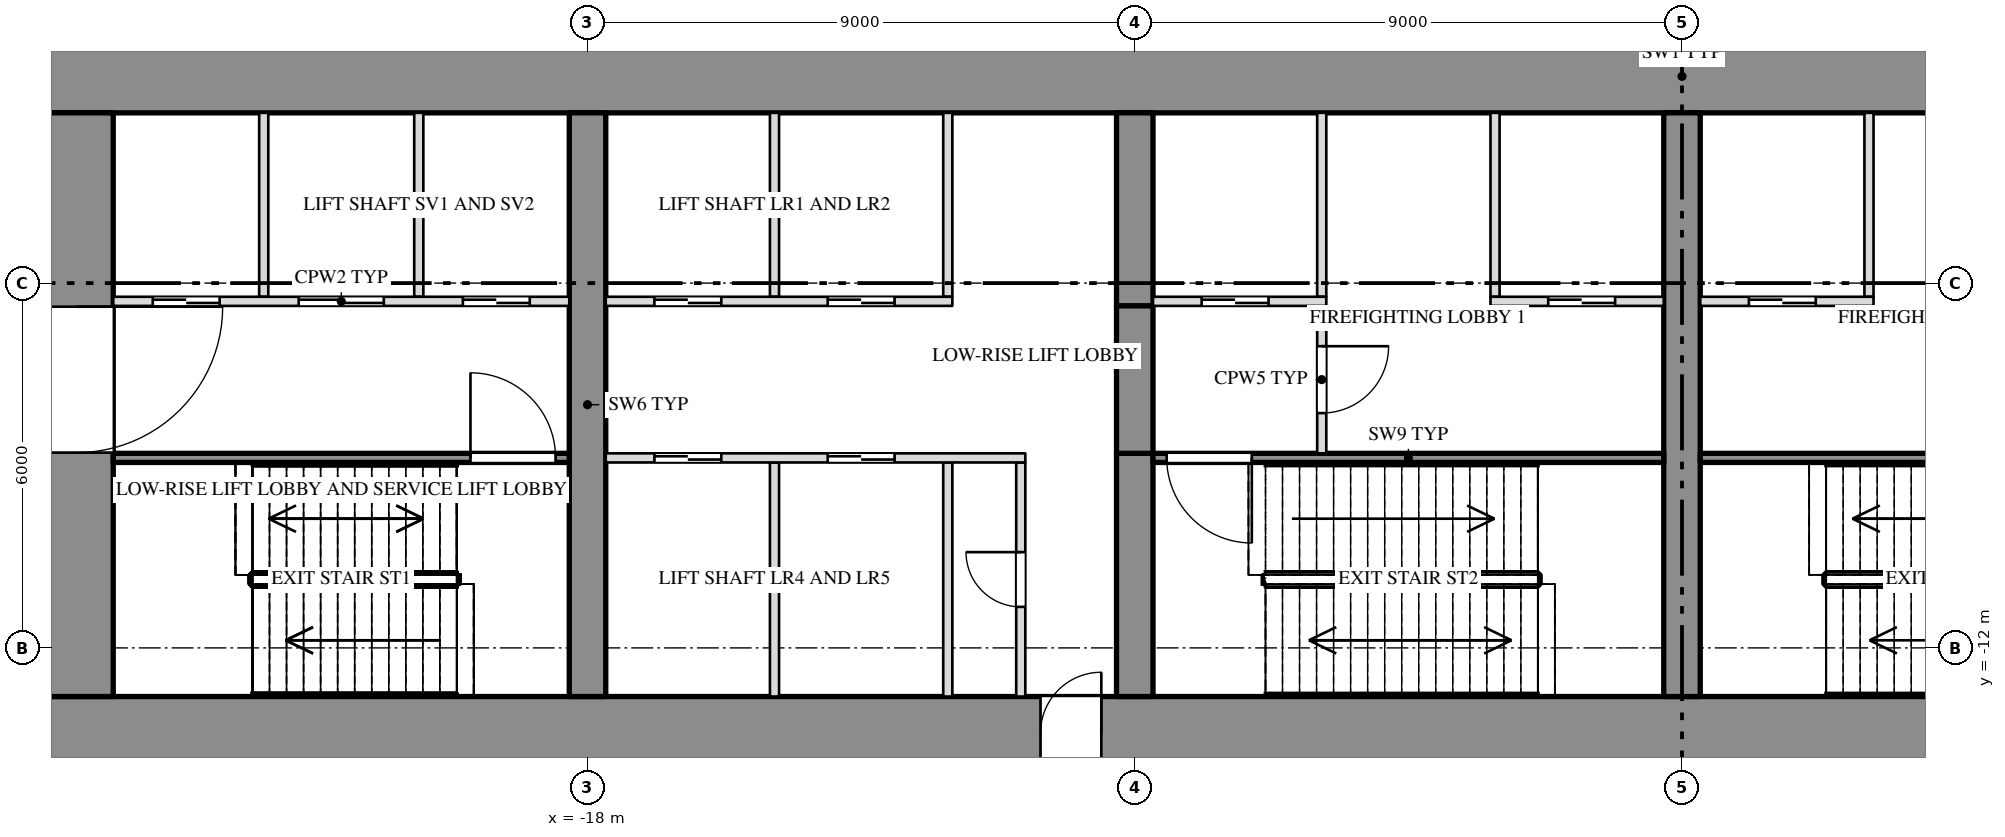
"""IFC4 building model, lengths in metres.
Left out: names, types, materials, properties, quantities, classifications, styles, units other than length and angle.
Written with IfcOpenShell. Run it as: python <this file> out.ifc"""

import sys

from ifc_helpers import new_model, si_unit, direction, frame, frame_2d, origin, place, context, subcontext, project, spatial, rectangle, extrude, element, fill, save


model = new_model("IFC4")
c1 = context("Model", 3, precision=1e-05, world=origin(), true_north=direction((0.0, 1.0)))
c2 = subcontext(c1, "Body", "Model", "MODEL_VIEW")
j1 = project(units=[si_unit("LENGTHUNIT", "METRE"), si_unit("PLANEANGLEUNIT", "RADIAN")], contexts=[c1])
p1 = place(None, origin())
s1 = spatial("IfcSite", under=j1, at=p1, CompositionType="ELEMENT")
p2 = place(p1, origin())
s2 = spatial("IfcBuilding", under=s1, at=p2, CompositionType="ELEMENT")
p3 = place(p2, frame((0.0, 0.0, 21.0)))
s3 = spatial("IfcBuildingStorey", under=s2, at=p3, CompositionType="ELEMENT", Elevation=21.0)
p4 = place(p3, frame((-27.0, -2.6, 0.0), z_axis=(0.0, 0.0, 1.0), x_axis=(1.0, 0.0, 0.0)))
e1 = element("IfcWall", 1, at=p4, inside=s3, PredefinedType="SHEAR", context=c2, shape_type="SweptSolid", body=[
    extrude(rectangle(XDim=54.0, YDim=1.2, at=frame_2d((27.0, 0.0))), origin(), (0.0, 0.0, 1.0), 5.7),
])
p5 = place(p3, frame((-27.0, -13.4, 0.0), z_axis=(0.0, 0.0, 1.0), x_axis=(1.0, 0.0, 0.0)))
e2 = element("IfcWall", 2, at=p5, inside=s3, PredefinedType="SHEAR", context=c2, shape_type="SweptSolid", body=[
    extrude(rectangle(XDim=54.0, YDim=1.2, at=frame_2d((27.0, 0.0))), origin(), (0.0, 0.0, 1.0), 5.7),
])
p6 = place(p5, frame((16.45, 0.0, 0.0)))
e3 = element("IfcOpeningElement", 3, at=p6, cuts=e2, PredefinedType="OPENING", context=c2, shape_type="SweptSolid", body=[
    extrude(rectangle(XDim=1.0, YDim=2.1, at=frame_2d((0.5, 1.05))), frame((0.0, 0.612, 0.0), z_axis=(0.0, -1.0, 0.0), x_axis=(1.0, 0.0, 0.0)), (0.0, 0.0, 1.0), 1.224),
])
p7 = place(p5, frame((36.55, 0.0, 0.0)))
e4 = element("IfcOpeningElement", 4, at=p7, cuts=e2, PredefinedType="OPENING", context=c2, shape_type="SweptSolid", body=[
    extrude(rectangle(XDim=1.0, YDim=2.1, at=frame_2d((0.5, 1.05))), frame((0.0, 0.612, 0.0), z_axis=(0.0, -1.0, 0.0), x_axis=(1.0, 0.0, 0.0)), (0.0, 0.0, 1.0), 1.224),
])
p8 = place(p3, frame((-26.4, -12.8, 0.0), z_axis=(0.0, 0.0, 1.0), x_axis=(0.0, 1.0, 0.0)))
e5 = element("IfcWall", 5, at=p8, inside=s3, PredefinedType="SHEAR", context=c2, shape_type="SweptSolid", body=[
    extrude(rectangle(XDim=9.6, YDim=1.2, at=frame_2d((4.8, 0.0))), origin(), (0.0, 0.0, 1.0), 5.7),
])
p9 = place(p8, frame((4.012, 0.0, 0.0)))
e6 = element("IfcOpeningElement", 6, at=p9, cuts=e5, PredefinedType="OPENING", context=c2, shape_type="SweptSolid", body=[
    extrude(rectangle(XDim=2.4, YDim=2.1, at=frame_2d((1.2, 1.05))), frame((0.0, 0.612, 0.0), z_axis=(0.0, -1.0, 0.0), x_axis=(1.0, 0.0, 0.0)), (0.0, 0.0, 1.0), 1.224),
])
p10 = place(p3, frame((-18.0, -12.8, 0.0), z_axis=(0.0, 0.0, 1.0), x_axis=(0.0, 1.0, 0.0)))
e7 = element("IfcWall", 7, at=p10, inside=s3, PredefinedType="SHEAR", context=c2, shape_type="SweptSolid", body=[
    extrude(rectangle(XDim=9.6, YDim=0.6, at=frame_2d((4.8, 0.0))), origin(), (0.0, 0.0, 1.0), 5.7),
])
p11 = place(p3, frame((-9.0, -12.8, 0.0), z_axis=(0.0, 0.0, 1.0), x_axis=(0.0, 1.0, 0.0)))
e8 = element("IfcWall", 8, at=p11, inside=s3, PredefinedType="SHEAR", context=c2, shape_type="SweptSolid", body=[
    extrude(rectangle(XDim=4.0, YDim=0.6, at=frame_2d((2.0, 0.0))), origin(), (0.0, 0.0, 1.0), 5.7),
])
p12 = place(p3, frame((-9.0, -6.375, 0.0), z_axis=(0.0, 0.0, 1.0), x_axis=(0.0, 1.0, 0.0)))
e9 = element("IfcWall", 9, at=p12, inside=s3, PredefinedType="SHEAR", context=c2, shape_type="SweptSolid", body=[
    extrude(rectangle(XDim=3.175, YDim=0.6, at=frame_2d((1.587, 0.0))), origin(), (0.0, 0.0, 1.0), 5.7),
])
p13 = place(p3, frame((-9.0, -8.8, 3.6), z_axis=(0.0, 0.0, 1.0), x_axis=(0.0, 1.0, 0.0)))
e10 = element("IfcWall", 10, at=p13, inside=s3, PredefinedType="SHEAR", context=c2, shape_type="SweptSolid", body=[
    extrude(rectangle(XDim=2.425, YDim=0.6, at=frame_2d((1.212, 0.0))), origin(), (0.0, 0.0, 1.0), 2.1),
])
p14 = place(p3, frame((0.0, -12.8, 0.0), z_axis=(0.0, 0.0, 1.0), x_axis=(0.0, 1.0, 0.0)))
e11 = element("IfcWall", 11, at=p14, inside=s3, PredefinedType="SHEAR", context=c2, shape_type="SweptSolid", body=[
    extrude(rectangle(XDim=9.6, YDim=0.6, at=frame_2d((4.8, 0.0))), origin(), (0.0, 0.0, 1.0), 5.7),
])
for number, where, z_axis, x_axis in (
    (12, (-20.775, -6.225, 0.0), (0.0, 0.0, 1.0), (0.0, 1.0, 0.0)),
    (13, (-23.325, -6.225, 0.0), (0.0, 0.0, 1.0), (0.0, 1.0, 0.0)),
    (14, (-12.075, -6.225, 0.0), (0.0, 0.0, 1.0), (0.0, 1.0, 0.0)),
    (15, (-14.925, -6.225, 0.0), (0.0, 0.0, 1.0), (0.0, 1.0, 0.0)),
    (16, (-3.075, -6.225, 0.0), (0.0, 0.0, 1.0), (0.0, 1.0, 0.0)),
    (17, (-5.925, -6.225, 0.0), (0.0, 0.0, 1.0), (0.0, 1.0, 0.0)),
    (18, (3.075, -6.225, 0.0), (0.0, 0.0, 1.0), (0.0, 1.0, 0.0)),
):
    element("IfcWall", number, at=place(p3, frame(where, z_axis=z_axis, x_axis=x_axis)), inside=s3, PredefinedType="PARTITIONING", context=c2, shape_type="SweptSolid", body=[
        extrude(rectangle(XDim=3.025, YDim=0.15, at=frame_2d((1.513, 0.0))), origin(), (0.0, 0.0, 1.0), 5.7),
    ])
p15 = place(p3, frame((-10.875, -12.8, 0.0), z_axis=(0.0, 0.0, 1.0), x_axis=(0.0, 1.0, 0.0)))
e19 = element("IfcWall", 19, at=p15, inside=s3, PredefinedType="PARTITIONING", context=c2, shape_type="SweptSolid", body=[
    extrude(rectangle(XDim=3.85, YDim=0.15, at=frame_2d((1.925, 0.0))), origin(), (0.0, 0.0, 1.0), 5.7),
])
p16 = place(p15, frame((1.475, 0.0, 0.0)))
e20 = element("IfcOpeningElement", 20, at=p16, cuts=e19, PredefinedType="OPENING", context=c2, shape_type="SweptSolid", body=[
    extrude(rectangle(XDim=0.9, YDim=2.1, at=frame_2d((0.45, 1.05))), frame((0.0, 0.087, 0.0), z_axis=(0.0, -1.0, 0.0), x_axis=(1.0, 0.0, 0.0)), (0.0, 0.0, 1.0), 0.174),
])
for number, where, z_axis, x_axis in (
    (21, (-12.075, -12.8, 0.0), (0.0, 0.0, 1.0), (0.0, 1.0, 0.0)),
    (22, (-14.925, -12.8, 0.0), (0.0, 0.0, 1.0), (0.0, 1.0, 0.0)),
):
    element("IfcWall", number, at=place(p3, frame(where, z_axis=z_axis, x_axis=x_axis)), inside=s3, PredefinedType="PARTITIONING", context=c2, shape_type="SweptSolid", body=[
        extrude(rectangle(XDim=3.85, YDim=0.15, at=frame_2d((1.925, 0.0))), origin(), (0.0, 0.0, 1.0), 5.7),
    ])
p17 = place(p3, frame((-5.925, -8.8, 0.0), z_axis=(0.0, 0.0, 1.0), x_axis=(0.0, 1.0, 0.0)))
e23 = element("IfcWall", 23, at=p17, inside=s3, PredefinedType="PARTITIONING", context=c2, shape_type="SweptSolid", body=[
    extrude(rectangle(XDim=2.425, YDim=0.15, at=frame_2d((1.212, 0.0))), origin(), (0.0, 0.0, 1.0), 5.7),
])
p18 = place(p17, frame((0.662, 0.0, 0.0)))
e24 = element("IfcOpeningElement", 24, at=p18, cuts=e23, PredefinedType="OPENING", context=c2, shape_type="SweptSolid", body=[
    extrude(rectangle(XDim=1.1, YDim=2.1, at=frame_2d((0.55, 1.05))), frame((0.0, 0.087, 0.0), z_axis=(0.0, -1.0, 0.0), x_axis=(1.0, 0.0, 0.0)), (0.0, 0.0, 1.0), 0.174),
])
p19 = place(p3, frame((-25.8, -6.3, 0.0), z_axis=(0.0, 0.0, 1.0), x_axis=(1.0, 0.0, 0.0)))
e25 = element("IfcWall", 25, at=p19, inside=s3, PredefinedType="PARTITIONING", context=c2, shape_type="SweptSolid", body=[
    extrude(rectangle(XDim=7.5, YDim=0.15, at=frame_2d((3.75, 0.0))), origin(), (0.0, 0.0, 1.0), 5.7),
])
p20 = place(p19, frame((0.65, 0.0, 0.0)))
e26 = element("IfcOpeningElement", 26, at=p20, cuts=e25, PredefinedType="OPENING", context=c2, shape_type="SweptSolid", body=[
    extrude(rectangle(XDim=1.1, YDim=2.1, at=frame_2d((0.55, 1.05))), frame((0.0, 0.087, 0.0), z_axis=(0.0, -1.0, 0.0), x_axis=(1.0, 0.0, 0.0)), (0.0, 0.0, 1.0), 0.174),
])
p21 = place(p19, frame((3.05, 0.0, 0.0)))
e27 = element("IfcOpeningElement", 27, at=p21, cuts=e25, PredefinedType="OPENING", context=c2, shape_type="SweptSolid", body=[
    extrude(rectangle(XDim=1.4, YDim=2.1, at=frame_2d((0.7, 1.05))), frame((0.0, 0.087, 0.0), z_axis=(0.0, -1.0, 0.0), x_axis=(1.0, 0.0, 0.0)), (0.0, 0.0, 1.0), 0.174),
])
p22 = place(p19, frame((5.75, 0.0, 0.0)))
e28 = element("IfcOpeningElement", 28, at=p22, cuts=e25, PredefinedType="OPENING", context=c2, shape_type="SweptSolid", body=[
    extrude(rectangle(XDim=1.1, YDim=2.1, at=frame_2d((0.55, 1.05))), frame((0.0, 0.087, 0.0), z_axis=(0.0, -1.0, 0.0), x_axis=(1.0, 0.0, 0.0)), (0.0, 0.0, 1.0), 0.174),
])
p23 = place(p3, frame((-17.7, -6.3, 0.0), z_axis=(0.0, 0.0, 1.0), x_axis=(1.0, 0.0, 0.0)))
e29 = element("IfcWall", 29, at=p23, inside=s3, PredefinedType="PARTITIONING", context=c2, shape_type="SweptSolid", body=[
    extrude(rectangle(XDim=5.7, YDim=0.15, at=frame_2d((2.85, 0.0))), origin(), (0.0, 0.0, 1.0), 5.7),
])
p24 = place(p23, frame((0.8, 0.0, 0.0)))
e30 = element("IfcOpeningElement", 30, at=p24, cuts=e29, PredefinedType="OPENING", context=c2, shape_type="SweptSolid", body=[
    extrude(rectangle(XDim=1.1, YDim=2.1, at=frame_2d((0.55, 1.05))), frame((0.0, 0.087, 0.0), z_axis=(0.0, -1.0, 0.0), x_axis=(1.0, 0.0, 0.0)), (0.0, 0.0, 1.0), 0.174),
])
p25 = place(p23, frame((3.65, 0.0, 0.0)))
e31 = element("IfcOpeningElement", 31, at=p25, cuts=e29, PredefinedType="OPENING", context=c2, shape_type="SweptSolid", body=[
    extrude(rectangle(XDim=1.1, YDim=2.1, at=frame_2d((0.55, 1.05))), frame((0.0, 0.087, 0.0), z_axis=(0.0, -1.0, 0.0), x_axis=(1.0, 0.0, 0.0)), (0.0, 0.0, 1.0), 0.174),
])
p26 = place(p3, frame((-8.7, -6.3, 0.0), z_axis=(0.0, 0.0, 1.0), x_axis=(1.0, 0.0, 0.0)))
e32 = element("IfcWall", 32, at=p26, inside=s3, PredefinedType="PARTITIONING", context=c2, shape_type="SweptSolid", body=[
    extrude(rectangle(XDim=2.85, YDim=0.15, at=frame_2d((1.425, 0.0))), origin(), (0.0, 0.0, 1.0), 5.7),
])
p27 = place(p26, frame((0.8, 0.0, 0.0)))
e33 = element("IfcOpeningElement", 33, at=p27, cuts=e32, PredefinedType="OPENING", context=c2, shape_type="SweptSolid", body=[
    extrude(rectangle(XDim=1.1, YDim=2.1, at=frame_2d((0.55, 1.05))), frame((0.0, 0.087, 0.0), z_axis=(0.0, -1.0, 0.0), x_axis=(1.0, 0.0, 0.0)), (0.0, 0.0, 1.0), 0.174),
])
p28 = place(p3, frame((-3.15, -6.3, 0.0), z_axis=(0.0, 0.0, 1.0), x_axis=(1.0, 0.0, 0.0)))
e34 = element("IfcWall", 34, at=p28, inside=s3, PredefinedType="PARTITIONING", context=c2, shape_type="SweptSolid", body=[
    extrude(rectangle(XDim=2.85, YDim=0.15, at=frame_2d((1.425, 0.0))), origin(), (0.0, 0.0, 1.0), 5.7),
])
p29 = place(p28, frame((0.95, 0.0, 0.0)))
e35 = element("IfcOpeningElement", 35, at=p29, cuts=e34, PredefinedType="OPENING", context=c2, shape_type="SweptSolid", body=[
    extrude(rectangle(XDim=1.1, YDim=2.1, at=frame_2d((0.55, 1.05))), frame((0.0, 0.087, 0.0), z_axis=(0.0, -1.0, 0.0), x_axis=(1.0, 0.0, 0.0)), (0.0, 0.0, 1.0), 0.174),
])
p30 = place(p3, frame((0.3, -6.3, 0.0), z_axis=(0.0, 0.0, 1.0), x_axis=(1.0, 0.0, 0.0)))
e36 = element("IfcWall", 36, at=p30, inside=s3, PredefinedType="PARTITIONING", context=c2, shape_type="SweptSolid", body=[
    extrude(rectangle(XDim=2.85, YDim=0.15, at=frame_2d((1.425, 0.0))), origin(), (0.0, 0.0, 1.0), 5.7),
])
p31 = place(p30, frame((0.8, 0.0, 0.0)))
e37 = element("IfcOpeningElement", 37, at=p31, cuts=e36, PredefinedType="OPENING", context=c2, shape_type="SweptSolid", body=[
    extrude(rectangle(XDim=1.1, YDim=2.1, at=frame_2d((0.55, 1.05))), frame((0.0, 0.087, 0.0), z_axis=(0.0, -1.0, 0.0), x_axis=(1.0, 0.0, 0.0)), (0.0, 0.0, 1.0), 0.174),
])
p32 = place(p3, frame((-25.8, -8.875, 0.0), z_axis=(0.0, 0.0, 1.0), x_axis=(1.0, 0.0, 0.0)))
e38 = element("IfcWall", 38, at=p32, inside=s3, PredefinedType="SHEAR", context=c2, shape_type="SweptSolid", body=[
    extrude(rectangle(XDim=7.5, YDim=0.15, at=frame_2d((3.75, 0.0))), origin(), (0.0, 0.0, 1.0), 5.7),
])
p33 = place(p32, frame((5.875, 0.0, 0.0)))
e39 = element("IfcOpeningElement", 39, at=p33, cuts=e38, PredefinedType="OPENING", context=c2, shape_type="SweptSolid", body=[
    extrude(rectangle(XDim=1.4, YDim=2.1, at=frame_2d((0.7, 1.05))), frame((0.0, 0.087, 0.0), z_axis=(0.0, -1.0, 0.0), x_axis=(1.0, 0.0, 0.0)), (0.0, 0.0, 1.0), 0.174),
])
p34 = place(p3, frame((-17.7, -8.875, 0.0), z_axis=(0.0, 0.0, 1.0), x_axis=(1.0, 0.0, 0.0)))
e40 = element("IfcWall", 40, at=p34, inside=s3, PredefinedType="PARTITIONING", context=c2, shape_type="SweptSolid", body=[
    extrude(rectangle(XDim=6.9, YDim=0.15, at=frame_2d((3.45, 0.0))), origin(), (0.0, 0.0, 1.0), 5.7),
])
p35 = place(p34, frame((0.8, 0.0, 0.0)))
e41 = element("IfcOpeningElement", 41, at=p35, cuts=e40, PredefinedType="OPENING", context=c2, shape_type="SweptSolid", body=[
    extrude(rectangle(XDim=1.1, YDim=2.1, at=frame_2d((0.55, 1.05))), frame((0.0, 0.087, 0.0), z_axis=(0.0, -1.0, 0.0), x_axis=(1.0, 0.0, 0.0)), (0.0, 0.0, 1.0), 0.174),
])
p36 = place(p34, frame((3.65, 0.0, 0.0)))
e42 = element("IfcOpeningElement", 42, at=p36, cuts=e40, PredefinedType="OPENING", context=c2, shape_type="SweptSolid", body=[
    extrude(rectangle(XDim=1.1, YDim=2.1, at=frame_2d((0.55, 1.05))), frame((0.0, 0.087, 0.0), z_axis=(0.0, -1.0, 0.0), x_axis=(1.0, 0.0, 0.0)), (0.0, 0.0, 1.0), 0.174),
])
p37 = place(p3, frame((-8.7, -8.875, 0.0), z_axis=(0.0, 0.0, 1.0), x_axis=(1.0, 0.0, 0.0)))
e43 = element("IfcWall", 43, at=p37, inside=s3, PredefinedType="SHEAR", context=c2, shape_type="SweptSolid", body=[
    extrude(rectangle(XDim=8.4, YDim=0.15, at=frame_2d((4.2, 0.0))), origin(), (0.0, 0.0, 1.0), 5.7),
])
p38 = place(p37, frame((0.225, 0.0, 0.0)))
e44 = element("IfcOpeningElement", 44, at=p38, cuts=e43, PredefinedType="OPENING", context=c2, shape_type="SweptSolid", body=[
    extrude(rectangle(XDim=1.4, YDim=2.1, at=frame_2d((0.7, 1.05))), frame((0.0, 0.087, 0.0), z_axis=(0.0, -1.0, 0.0), x_axis=(1.0, 0.0, 0.0)), (0.0, 0.0, 1.0), 0.174),
])
p39 = place(p3, frame((0.3, -8.875, 0.0), z_axis=(0.0, 0.0, 1.0), x_axis=(1.0, 0.0, 0.0)))
e45 = element("IfcWall", 45, at=p39, inside=s3, PredefinedType="SHEAR", context=c2, shape_type="SweptSolid", body=[
    extrude(rectangle(XDim=8.4, YDim=0.15, at=frame_2d((4.2, 0.0))), origin(), (0.0, 0.0, 1.0), 5.7),
])
p40 = place(p39, frame((6.775, 0.0, 0.0)))
e46 = element("IfcOpeningElement", 46, at=p40, cuts=e45, PredefinedType="OPENING", context=c2, shape_type="SweptSolid", body=[
    extrude(rectangle(XDim=1.4, YDim=2.1, at=frame_2d((0.7, 1.05))), frame((0.0, 0.087, 0.0), z_axis=(0.0, -1.0, 0.0), x_axis=(1.0, 0.0, 0.0)), (0.0, 0.0, 1.0), 0.174),
])
p41 = place(p9, origin())
e47 = element("IfcDoor", 47, at=p41, inside=s3, OperationType="DOUBLE_DOOR_SINGLE_SWING", PredefinedType="DOOR", context=c2, shape_type="SweptSolid", body=[
    extrude(rectangle(XDim=2.4, YDim=2.1, at=frame_2d((1.2, 1.05))), frame((0.0, 0.025, 0.0), z_axis=(0.0, -1.0, 0.0), x_axis=(1.0, 0.0, 0.0)), (0.0, 0.0, 1.0), 0.05),
])
fill(e6, e47)
p42 = place(p20, origin())
e48 = element("IfcDoor", 48, at=p42, inside=s3, OperationType="SLIDING_TO_RIGHT", PredefinedType="DOOR", context=c2, shape_type="SweptSolid", body=[
    extrude(rectangle(XDim=1.1, YDim=2.1, at=frame_2d((0.55, 1.05))), frame((0.0, 0.025, 0.0), z_axis=(0.0, -1.0, 0.0), x_axis=(1.0, 0.0, 0.0)), (0.0, 0.0, 1.0), 0.05),
])
fill(e26, e48)
p43 = place(p21, origin())
e49 = element("IfcDoor", 49, at=p43, inside=s3, OperationType="SLIDING_TO_LEFT", PredefinedType="DOOR", context=c2, shape_type="SweptSolid", body=[
    extrude(rectangle(XDim=1.4, YDim=2.1, at=frame_2d((0.7, 1.05))), frame((0.0, 0.025, 0.0), z_axis=(0.0, -1.0, 0.0), x_axis=(1.0, 0.0, 0.0)), (0.0, 0.0, 1.0), 0.05),
])
fill(e27, e49)
p44 = place(p22, origin())
e50 = element("IfcDoor", 50, at=p44, inside=s3, OperationType="SLIDING_TO_RIGHT", PredefinedType="DOOR", context=c2, shape_type="SweptSolid", body=[
    extrude(rectangle(XDim=1.1, YDim=2.1, at=frame_2d((0.55, 1.05))), frame((0.0, 0.025, 0.0), z_axis=(0.0, -1.0, 0.0), x_axis=(1.0, 0.0, 0.0)), (0.0, 0.0, 1.0), 0.05),
])
fill(e28, e50)
p45 = place(p33, origin())
e51 = element("IfcDoor", 51, at=p45, inside=s3, OperationType="DOUBLE_DOOR_SINGLE_SWING", PredefinedType="DOOR", context=c2, shape_type="SweptSolid", body=[
    extrude(rectangle(XDim=1.4, YDim=2.1, at=frame_2d((0.7, 1.05))), frame((0.0, 0.025, 0.0), z_axis=(0.0, -1.0, 0.0), x_axis=(1.0, 0.0, 0.0)), (0.0, 0.0, 1.0), 0.05),
])
fill(e39, e51)
p46 = place(p35, origin())
e52 = element("IfcDoor", 52, at=p46, inside=s3, OperationType="SLIDING_TO_RIGHT", PredefinedType="DOOR", context=c2, shape_type="SweptSolid", body=[
    extrude(rectangle(XDim=1.1, YDim=2.1, at=frame_2d((0.55, 1.05))), frame((0.0, 0.025, 0.0), z_axis=(0.0, -1.0, 0.0), x_axis=(1.0, 0.0, 0.0)), (0.0, 0.0, 1.0), 0.05),
])
fill(e41, e52)
p47 = place(p24, origin())
e53 = element("IfcDoor", 53, at=p47, inside=s3, OperationType="SLIDING_TO_LEFT", PredefinedType="DOOR", context=c2, shape_type="SweptSolid", body=[
    extrude(rectangle(XDim=1.1, YDim=2.1, at=frame_2d((0.55, 1.05))), frame((0.0, 0.025, 0.0), z_axis=(0.0, -1.0, 0.0), x_axis=(1.0, 0.0, 0.0)), (0.0, 0.0, 1.0), 0.05),
])
fill(e30, e53)
p48 = place(p36, origin())
e54 = element("IfcDoor", 54, at=p48, inside=s3, OperationType="SLIDING_TO_RIGHT", PredefinedType="DOOR", context=c2, shape_type="SweptSolid", body=[
    extrude(rectangle(XDim=1.1, YDim=2.1, at=frame_2d((0.55, 1.05))), frame((0.0, 0.025, 0.0), z_axis=(0.0, -1.0, 0.0), x_axis=(1.0, 0.0, 0.0)), (0.0, 0.0, 1.0), 0.05),
])
fill(e42, e54)
p49 = place(p25, origin())
e55 = element("IfcDoor", 55, at=p49, inside=s3, OperationType="SLIDING_TO_LEFT", PredefinedType="DOOR", context=c2, shape_type="SweptSolid", body=[
    extrude(rectangle(XDim=1.1, YDim=2.1, at=frame_2d((0.55, 1.05))), frame((0.0, 0.025, 0.0), z_axis=(0.0, -1.0, 0.0), x_axis=(1.0, 0.0, 0.0)), (0.0, 0.0, 1.0), 0.05),
])
fill(e31, e55)
p50 = place(p16, origin())
e56 = element("IfcDoor", 56, at=p50, inside=s3, OperationType="SINGLE_SWING_RIGHT", PredefinedType="DOOR", context=c2, shape_type="SweptSolid", body=[
    extrude(rectangle(XDim=0.9, YDim=2.1, at=frame_2d((0.45, 1.05))), frame((0.0, 0.025, 0.0), z_axis=(0.0, -1.0, 0.0), x_axis=(1.0, 0.0, 0.0)), (0.0, 0.0, 1.0), 0.05),
])
fill(e20, e56)
p51 = place(p6, origin())
e57 = element("IfcDoor", 57, at=p51, inside=s3, OperationType="SINGLE_SWING_RIGHT", PredefinedType="DOOR", context=c2, shape_type="SweptSolid", body=[
    extrude(rectangle(XDim=1.0, YDim=2.1, at=frame_2d((0.5, 1.05))), frame((0.0, 0.025, 0.0), z_axis=(0.0, -1.0, 0.0), x_axis=(1.0, 0.0, 0.0)), (0.0, 0.0, 1.0), 0.05),
])
fill(e3, e57)
p52 = place(p38, origin())
e58 = element("IfcDoor", 58, at=p52, inside=s3, OperationType="DOUBLE_DOOR_SINGLE_SWING", PredefinedType="DOOR", context=c2, shape_type="SweptSolid", body=[
    extrude(rectangle(XDim=1.4, YDim=2.1, at=frame_2d((0.7, 1.05))), frame((0.0, 0.025, 0.0), z_axis=(0.0, -1.0, 0.0), x_axis=(1.0, 0.0, 0.0)), (0.0, 0.0, 1.0), 0.05),
])
fill(e44, e58)
p53 = place(p27, origin())
e59 = element("IfcDoor", 59, at=p53, inside=s3, OperationType="SLIDING_TO_LEFT", PredefinedType="DOOR", context=c2, shape_type="SweptSolid", body=[
    extrude(rectangle(XDim=1.1, YDim=2.1, at=frame_2d((0.55, 1.05))), frame((0.0, 0.025, 0.0), z_axis=(0.0, -1.0, 0.0), x_axis=(1.0, 0.0, 0.0)), (0.0, 0.0, 1.0), 0.05),
])
fill(e33, e59)
p54 = place(p18, origin())
e60 = element("IfcDoor", 60, at=p54, inside=s3, OperationType="SINGLE_SWING_LEFT", PredefinedType="DOOR", context=c2, shape_type="SweptSolid", body=[
    extrude(rectangle(XDim=1.1, YDim=2.1, at=frame_2d((0.55, 1.05))), frame((0.0, 0.025, 0.0), z_axis=(0.0, -1.0, 0.0), x_axis=(1.0, 0.0, 0.0)), (0.0, 0.0, 1.0), 0.05),
])
fill(e24, e60)
p55 = place(p29, origin())
e61 = element("IfcDoor", 61, at=p55, inside=s3, OperationType="SLIDING_TO_LEFT", PredefinedType="DOOR", context=c2, shape_type="SweptSolid", body=[
    extrude(rectangle(XDim=1.1, YDim=2.1, at=frame_2d((0.55, 1.05))), frame((0.0, 0.025, 0.0), z_axis=(0.0, -1.0, 0.0), x_axis=(1.0, 0.0, 0.0)), (0.0, 0.0, 1.0), 0.05),
])
fill(e35, e61)
p56 = place(p31, origin())
e62 = element("IfcDoor", 62, at=p56, inside=s3, OperationType="SLIDING_TO_RIGHT", PredefinedType="DOOR", context=c2, shape_type="SweptSolid", body=[
    extrude(rectangle(XDim=1.1, YDim=2.1, at=frame_2d((0.55, 1.05))), frame((0.0, 0.025, 0.0), z_axis=(0.0, -1.0, 0.0), x_axis=(1.0, 0.0, 0.0)), (0.0, 0.0, 1.0), 0.05),
])
fill(e37, e62)
save(model, sys.argv[1])
